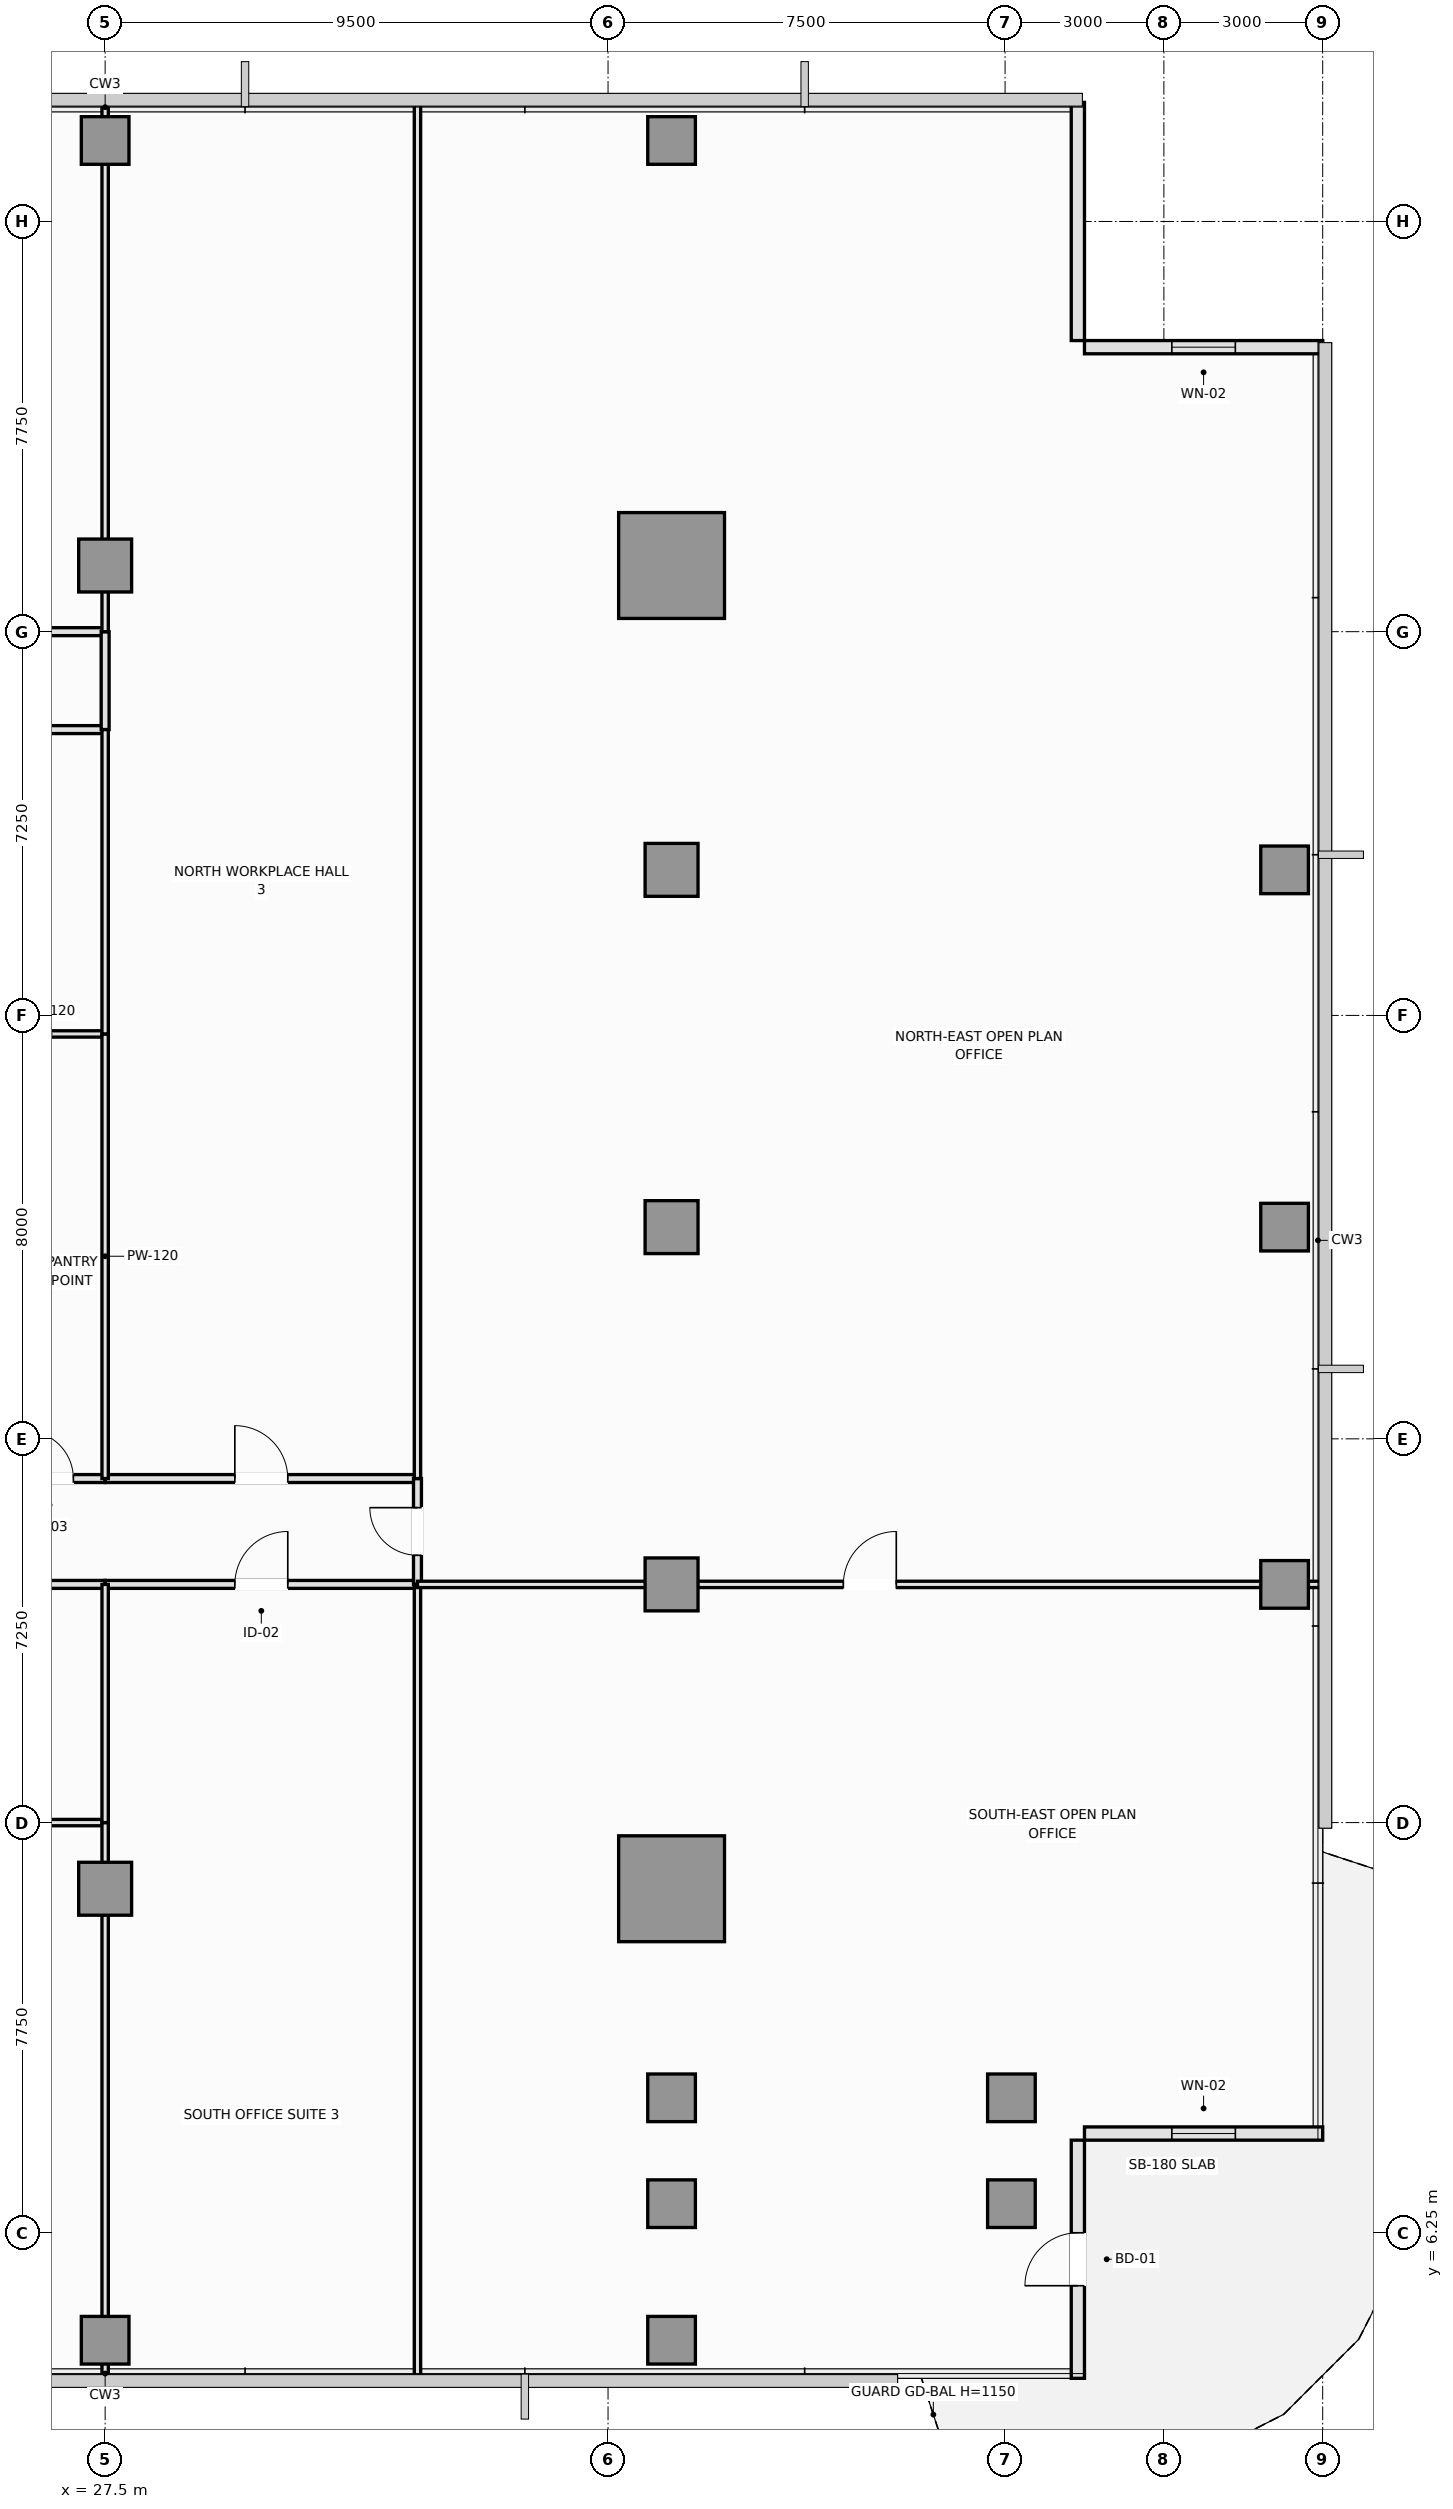
"""IFC4 building model, lengths in metres.
Left out: names, types, materials, properties, quantities, classifications, styles, units other than length and angle.
Written with IfcOpenShell. Run it as: python <this file> out.ifc"""

import sys

from ifc_helpers import new_model, si_unit, direction, frame, frame_2d, origin, origin_2d, place, context, subcontext, project, spatial, rectangle, extrude, element, fill, save


model = new_model("IFC4")
c1 = context("Model", 3, precision=1e-05, world=origin(), true_north=direction((0.0, 1.0)))
c2 = subcontext(c1, "Body", "Model", "MODEL_VIEW")
j1 = project(units=[si_unit("LENGTHUNIT", "METRE"), si_unit("PLANEANGLEUNIT", "RADIAN")], contexts=[c1])
p1 = place(None, origin())
s1 = spatial("IfcSite", under=j1, at=p1, CompositionType="ELEMENT")
p2 = place(p1, origin())
s2 = spatial("IfcBuilding", under=s1, at=p2, CompositionType="ELEMENT")
p3 = place(p2, frame((0.0, 0.0, 137.75)))
s3 = spatial("IfcBuildingStorey", under=s2, at=p3, CompositionType="ELEMENT", Elevation=137.75)
for number, where, z_axis, x_axis in (
    (1, (38.2, 12.75, 0.0), (0.0, 0.0, 1.0), (1.0, 0.0, 0.0)),
    (2, (38.2, 37.75, 0.0), (0.0, 0.0, 1.0), (1.0, 0.0, 0.0)),
):
    element("IfcColumn", number, at=place(p3, frame(where, z_axis=z_axis, x_axis=x_axis)), inside=s3, PredefinedType="COLUMN", context=c2, shape_type="SweptSolid", body=[
        extrude(rectangle(XDim=2.0, YDim=2.0, at=origin_2d()), origin(), (0.0, 0.0, 1.0), 3.55),
    ])
for number, where, z_axis, x_axis in (
    (3, (27.5, 12.75, 0.0), (0.0, 0.0, 1.0), (1.0, 0.0, 0.0)),
    (4, (27.5, 37.75, 0.0), (0.0, 0.0, 1.0), (1.0, 0.0, 0.0)),
    (5, (38.2, 18.5, 0.0), (0.0, 0.0, 1.0), (1.0, 0.0, 0.0)),
    (6, (38.2, 25.25, 0.0), (0.0, 0.0, 1.0), (1.0, 0.0, 0.0)),
    (7, (38.2, 32.0, 0.0), (0.0, 0.0, 1.0), (1.0, 0.0, 0.0)),
):
    element("IfcColumn", number, at=place(p3, frame(where, z_axis=z_axis, x_axis=x_axis)), inside=s3, PredefinedType="COLUMN", context=c2, shape_type="SweptSolid", body=[
        extrude(rectangle(XDim=1.0, YDim=1.0, at=origin_2d()), origin(), (0.0, 0.0, 1.0), 3.55),
    ])
for number, where, z_axis, x_axis in (
    (8, (38.2, 6.8, 0.0), (0.0, 0.0, 1.0), (1.0, 0.0, 0.0)),
    (9, (38.2, 8.8, 0.0), (0.0, 0.0, 1.0), (1.0, 0.0, 0.0)),
    (10, (44.62, 6.8, 0.0), (0.0, 0.0, 1.0), (1.0, 0.0, 0.0)),
    (11, (44.62, 8.8, 0.0), (0.0, 0.0, 1.0), (1.0, 0.0, 0.0)),
    (12, (49.78, 18.5, 0.0), (0.0, 0.0, 1.0), (1.0, 0.0, 0.0)),
    (13, (49.78, 25.25, 0.0), (0.0, 0.0, 1.0), (1.0, 0.0, 0.0)),
    (14, (49.78, 32.0, 0.0), (0.0, 0.0, 1.0), (1.0, 0.0, 0.0)),
    (15, (27.5, 4.22, 0.0), (0.0, 0.0, 1.0), (1.0, 0.0, 0.0)),
    (16, (38.2, 4.22, 0.0), (0.0, 0.0, 1.0), (1.0, 0.0, 0.0)),
    (17, (27.5, 45.78, 0.0), (0.0, 0.0, 1.0), (1.0, 0.0, 0.0)),
    (18, (38.2, 45.78, 0.0), (0.0, 0.0, 1.0), (1.0, 0.0, 0.0)),
):
    element("IfcColumn", number, at=place(p3, frame(where, z_axis=z_axis, x_axis=x_axis)), inside=s3, PredefinedType="COLUMN", context=c2, shape_type="SweptSolid", body=[
        extrude(rectangle(XDim=0.9, YDim=0.9, at=origin_2d()), origin(), (0.0, 0.0, 1.0), 3.55),
    ])
p4 = place(p3, frame((45.875, 3.5, 0.0), z_axis=(0.0, 0.0, 1.0), x_axis=(0.0, 1.0, 0.0)))
e19 = element("IfcWall", 19, at=p4, inside=s3, PredefinedType="SOLIDWALL", context=c2, shape_type="SweptSolid", body=[
    extrude(rectangle(XDim=4.5, YDim=0.25, at=frame_2d((2.25, 0.0))), origin(), (0.0, 0.0, 1.0), 3.07),
])
p5 = place(p4, frame((1.75, 0.0, 0.0)))
e20 = element("IfcOpeningElement", 20, at=p5, cuts=e19, PredefinedType="OPENING", context=c2, shape_type="SweptSolid", body=[
    extrude(rectangle(XDim=1.0, YDim=2.2, at=frame_2d((0.5, 1.1))), frame((0.0, 0.135, 0.0), z_axis=(0.0, -1.0, 0.0), x_axis=(1.0, 0.0, 0.0)), (0.0, 0.0, 1.0), 0.27),
])
p6 = place(p3, frame((46.0, 8.125, 0.0), z_axis=(0.0, 0.0, 1.0), x_axis=(1.0, 0.0, 0.0)))
e21 = element("IfcWall", 21, at=p6, inside=s3, PredefinedType="SOLIDWALL", context=c2, shape_type="SweptSolid", body=[
    extrude(rectangle(XDim=4.5, YDim=0.25, at=frame_2d((2.25, 0.0))), origin(), (0.0, 0.0, 1.0), 3.1),
])
p7 = place(p6, frame((1.65, 0.0, 0.9)))
e22 = element("IfcOpeningElement", 22, at=p7, cuts=e21, PredefinedType="OPENING", context=c2, shape_type="SweptSolid", body=[
    extrude(rectangle(XDim=1.2, YDim=1.8, at=frame_2d((0.6, 0.9))), frame((0.0, 0.135, 0.0), z_axis=(0.0, -1.0, 0.0), x_axis=(1.0, 0.0, 0.0)), (0.0, 0.0, 1.0), 0.27),
])
p8 = place(p3, frame((50.5, 41.875, 0.0), z_axis=(0.0, 0.0, 1.0), x_axis=(-1.0, 0.0, 0.0)))
e23 = element("IfcWall", 23, at=p8, inside=s3, PredefinedType="SOLIDWALL", context=c2, shape_type="SweptSolid", body=[
    extrude(rectangle(XDim=4.5, YDim=0.25, at=frame_2d((2.25, 0.0))), origin(), (0.0, 0.0, 1.0), 3.37),
])
p9 = place(p8, frame((1.65, 0.0, 0.9)))
e24 = element("IfcOpeningElement", 24, at=p9, cuts=e23, PredefinedType="OPENING", context=c2, shape_type="SweptSolid", body=[
    extrude(rectangle(XDim=1.2, YDim=1.8, at=frame_2d((0.6, 0.9))), frame((0.0, 0.135, 0.0), z_axis=(0.0, -1.0, 0.0), x_axis=(1.0, 0.0, 0.0)), (0.0, 0.0, 1.0), 0.27),
])
p10 = place(p3, frame((45.875, 42.0, 0.0), z_axis=(0.0, 0.0, 1.0), x_axis=(0.0, 1.0, 0.0)))
e25 = element("IfcWall", 25, at=p10, inside=s3, PredefinedType="SOLIDWALL", context=c2, shape_type="SweptSolid", body=[
    extrude(rectangle(XDim=4.5, YDim=0.25, at=frame_2d((2.25, 0.0))), origin(), (0.0, 0.0, 1.0), 3.37),
])
p11 = place(p3, frame((25.4, 20.5, 0.0), z_axis=(0.0, 0.0, 1.0), x_axis=(1.0, 0.0, 0.0)))
e26 = element("IfcWall", 26, at=p11, inside=s3, PredefinedType="PARTITIONING", context=c2, shape_type="SweptSolid", body=[
    extrude(rectangle(XDim=2.1, YDim=0.15, at=frame_2d((1.05, 0.0))), origin(), (0.0, 0.0, 1.0), 3.37),
])
p12 = place(p11, frame((0.6, 0.0, 0.0)))
e27 = element("IfcOpeningElement", 27, at=p12, cuts=e26, PredefinedType="OPENING", context=c2, shape_type="SweptSolid", body=[
    extrude(rectangle(XDim=0.9, YDim=2.1, at=frame_2d((0.45, 1.05))), frame((0.0, 0.085, 0.0), z_axis=(0.0, -1.0, 0.0), x_axis=(1.0, 0.0, 0.0)), (0.0, 0.0, 1.0), 0.17),
])
p13 = place(p3, frame((19.95, 18.5, 0.0), z_axis=(0.0, 0.0, 1.0), x_axis=(1.0, 0.0, 0.0)))
e28 = element("IfcWall", 28, at=p13, inside=s3, PredefinedType="PARTITIONING", context=c2, shape_type="SweptSolid", body=[
    extrude(rectangle(XDim=7.55, YDim=0.15, at=frame_2d((3.775, 0.0))), origin(), (0.0, 0.0, 1.0), 2.77),
])
p14 = place(p3, frame((27.5, 18.5, 0.0), z_axis=(0.0, 0.0, 1.0), x_axis=(1.0, 0.0, 0.0)))
e29 = element("IfcWall", 29, at=p14, inside=s3, PredefinedType="PARTITIONING", context=c2, shape_type="SweptSolid", body=[
    extrude(rectangle(XDim=5.9, YDim=0.15, at=frame_2d((2.95, 0.0))), origin(), (0.0, 0.0, 1.0), 2.77),
])
p15 = place(p14, frame((2.45, 0.0, 0.0)))
e30 = element("IfcOpeningElement", 30, at=p15, cuts=e29, PredefinedType="OPENING", context=c2, shape_type="SweptSolid", body=[
    extrude(rectangle(XDim=1.0, YDim=2.15, at=frame_2d((0.5, 1.075))), frame((0.0, 0.085, 0.0), z_axis=(0.0, -1.0, 0.0), x_axis=(1.0, 0.0, 0.0)), (0.0, 0.0, 1.0), 0.17),
])
p16 = place(p3, frame((27.5, 20.5, 0.0), z_axis=(0.0, 0.0, 1.0), x_axis=(1.0, 0.0, 0.0)))
e31 = element("IfcWall", 31, at=p16, inside=s3, PredefinedType="PARTITIONING", context=c2, shape_type="SweptSolid", body=[
    extrude(rectangle(XDim=5.9, YDim=0.15, at=frame_2d((2.95, 0.0))), origin(), (0.0, 0.0, 1.0), 3.37),
])
p17 = place(p16, frame((2.45, 0.0, 0.0)))
e32 = element("IfcOpeningElement", 32, at=p17, cuts=e31, PredefinedType="OPENING", context=c2, shape_type="SweptSolid", body=[
    extrude(rectangle(XDim=1.0, YDim=2.15, at=frame_2d((0.5, 1.075))), frame((0.0, 0.085, 0.0), z_axis=(0.0, -1.0, 0.0), x_axis=(1.0, 0.0, 0.0)), (0.0, 0.0, 1.0), 0.17),
])
p18 = place(p3, frame((33.4, 18.5, 0.0), z_axis=(0.0, 0.0, 1.0), x_axis=(0.0, 1.0, 0.0)))
e33 = element("IfcWall", 33, at=p18, inside=s3, PredefinedType="PARTITIONING", context=c2, shape_type="SweptSolid", body=[
    extrude(rectangle(XDim=2.0, YDim=0.15, at=frame_2d((1.0, 0.0))), origin(), (0.0, 0.0, 1.0), 3.37),
])
p19 = place(p18, frame((0.55, 0.0, 0.0)))
e34 = element("IfcOpeningElement", 34, at=p19, cuts=e33, PredefinedType="OPENING", context=c2, shape_type="SweptSolid", body=[
    extrude(rectangle(XDim=0.9, YDim=2.1, at=frame_2d((0.45, 1.05))), frame((0.0, 0.085, 0.0), z_axis=(0.0, -1.0, 0.0), x_axis=(1.0, 0.0, 0.0)), (0.0, 0.0, 1.0), 0.17),
])
p20 = place(p3, frame((19.95, 34.65, 0.0), z_axis=(0.0, 0.0, 1.0), x_axis=(1.0, 0.0, 0.0)))
e35 = element("IfcWall", 35, at=p20, inside=s3, PredefinedType="PARTITIONING", context=c2, shape_type="SweptSolid", body=[
    extrude(rectangle(XDim=7.55, YDim=0.15, at=frame_2d((3.775, 0.0))), origin(), (0.0, 0.0, 1.0), 3.37),
])
p21 = place(p3, frame((19.95, 36.5, 0.0), z_axis=(0.0, 0.0, 1.0), x_axis=(1.0, 0.0, 0.0)))
e36 = element("IfcWall", 36, at=p21, inside=s3, PredefinedType="PARTITIONING", context=c2, shape_type="SweptSolid", body=[
    extrude(rectangle(XDim=7.55, YDim=0.15, at=frame_2d((3.775, 0.0))), origin(), (0.0, 0.0, 1.0), 3.37),
])
p22 = place(p21, frame((3.275, 0.0, 0.0)))
e37 = element("IfcOpeningElement", 37, at=p22, cuts=e36, PredefinedType="OPENING", context=c2, shape_type="SweptSolid", body=[
    extrude(rectangle(XDim=1.0, YDim=2.15, at=frame_2d((0.5, 1.075))), frame((0.0, 0.085, 0.0), z_axis=(0.0, -1.0, 0.0), x_axis=(1.0, 0.0, 0.0)), (0.0, 0.0, 1.0), 0.17),
])
p23 = place(p3, frame((27.5, 34.65, 0.0), z_axis=(0.0, 0.0, 1.0), x_axis=(0.0, 1.0, 0.0)))
e38 = element("IfcWall", 38, at=p23, inside=s3, PredefinedType="PARTITIONING", context=c2, shape_type="SweptSolid", body=[
    extrude(rectangle(XDim=1.85, YDim=0.15, at=frame_2d((0.925, 0.0))), origin(), (0.0, 0.0, 1.0), 3.37),
])
p24 = place(p3, frame((25.4, 28.9, 0.0), z_axis=(0.0, 0.0, 1.0), x_axis=(1.0, 0.0, 0.0)))
e39 = element("IfcWall", 39, at=p24, inside=s3, PredefinedType="PARTITIONING", context=c2, shape_type="SweptSolid", body=[
    extrude(rectangle(XDim=2.1, YDim=0.12, at=frame_2d((1.05, 0.0))), origin(), (0.0, 0.0, 1.0), 3.37),
])
p25 = place(p3, frame((27.5, 20.5, 0.0), z_axis=(0.0, 0.0, 1.0), x_axis=(0.0, 1.0, 0.0)))
e40 = element("IfcWall", 40, at=p25, inside=s3, PredefinedType="PARTITIONING", context=c2, shape_type="SweptSolid", body=[
    extrude(rectangle(XDim=8.4, YDim=0.12, at=frame_2d((4.2, 0.0))), origin(), (0.0, 0.0, 1.0), 3.37),
])
p26 = place(p3, frame((27.5, 28.9, 0.0), z_axis=(0.0, 0.0, 1.0), x_axis=(0.0, 1.0, 0.0)))
e41 = element("IfcWall", 41, at=p26, inside=s3, PredefinedType="PARTITIONING", context=c2, shape_type="SweptSolid", body=[
    extrude(rectangle(XDim=5.75, YDim=0.12, at=frame_2d((2.875, 0.0))), origin(), (0.0, 0.0, 1.0), 3.37),
])
p27 = place(p3, frame((19.95, 14.0, 0.0), z_axis=(0.0, 0.0, 1.0), x_axis=(1.0, 0.0, 0.0)))
e42 = element("IfcWall", 42, at=p27, inside=s3, PredefinedType="PARTITIONING", context=c2, shape_type="SweptSolid", body=[
    extrude(rectangle(XDim=7.55, YDim=0.12, at=frame_2d((3.775, 0.0))), origin(), (0.0, 0.0, 1.0), 3.37),
])
p28 = place(p3, frame((27.5, 3.51, 0.0), z_axis=(0.0, 0.0, 1.0), x_axis=(0.0, 1.0, 0.0)))
e43 = element("IfcWall", 43, at=p28, inside=s3, PredefinedType="PARTITIONING", context=c2, shape_type="SweptSolid", body=[
    extrude(rectangle(XDim=10.49, YDim=0.12, at=frame_2d((5.245, 0.0))), origin(), (0.0, 0.0, 1.0), 2.87),
])
p29 = place(p3, frame((27.5, 14.0, 0.0), z_axis=(0.0, 0.0, 1.0), x_axis=(0.0, 1.0, 0.0)))
e44 = element("IfcWall", 44, at=p29, inside=s3, PredefinedType="PARTITIONING", context=c2, shape_type="SweptSolid", body=[
    extrude(rectangle(XDim=4.5, YDim=0.12, at=frame_2d((2.25, 0.0))), origin(), (0.0, 0.0, 1.0), 3.37),
])
p30 = place(p3, frame((33.4, 3.51, 0.0), z_axis=(0.0, 0.0, 1.0), x_axis=(0.0, 1.0, 0.0)))
e45 = element("IfcWall", 45, at=p30, inside=s3, PredefinedType="PARTITIONING", context=c2, shape_type="SweptSolid", body=[
    extrude(rectangle(XDim=14.99, YDim=0.12, at=frame_2d((7.495, 0.0))), origin(), (0.0, 0.0, 1.0), 3.37),
])
p31 = place(p3, frame((27.5, 36.5, 0.0), z_axis=(0.0, 0.0, 1.0), x_axis=(0.0, 1.0, 0.0)))
e46 = element("IfcWall", 46, at=p31, inside=s3, PredefinedType="PARTITIONING", context=c2, shape_type="SweptSolid", body=[
    extrude(rectangle(XDim=9.99, YDim=0.12, at=frame_2d((4.995, 0.0))), origin(), (0.0, 0.0, 1.0), 2.87),
])
p32 = place(p3, frame((33.4, 20.5, 0.0), z_axis=(0.0, 0.0, 1.0), x_axis=(0.0, 1.0, 0.0)))
e47 = element("IfcWall", 47, at=p32, inside=s3, PredefinedType="PARTITIONING", context=c2, shape_type="SweptSolid", body=[
    extrude(rectangle(XDim=25.99, YDim=0.12, at=frame_2d((12.995, 0.0))), origin(), (0.0, 0.0, 1.0), 3.37),
])
p33 = place(p3, frame((33.4, 18.5, 0.0), z_axis=(0.0, 0.0, 1.0), x_axis=(1.0, 0.0, 0.0)))
e48 = element("IfcWall", 48, at=p33, inside=s3, PredefinedType="PARTITIONING", context=c2, shape_type="SweptSolid", body=[
    extrude(rectangle(XDim=17.09, YDim=0.12, at=frame_2d((8.545, 0.0))), origin(), (0.0, 0.0, 1.0), 2.77),
])
p34 = place(p33, frame((8.045, 0.0, 0.0)))
e49 = element("IfcOpeningElement", 49, at=p34, cuts=e48, PredefinedType="OPENING", context=c2, shape_type="SweptSolid", body=[
    extrude(rectangle(XDim=1.0, YDim=2.15, at=frame_2d((0.5, 1.075))), frame((0.0, 0.07, 0.0), z_axis=(0.0, -1.0, 0.0), x_axis=(1.0, 0.0, 0.0)), (0.0, 0.0, 1.0), 0.14),
])
p35 = place(p5, frame((1.0, 0.0, 0.0), z_axis=(0.0, 0.0, 1.0), x_axis=(-1.0, 0.0, 0.0)))
e50 = element("IfcDoor", 50, at=p35, inside=s3, OperationType="SINGLE_SWING_LEFT", PredefinedType="DOOR", context=c2, shape_type="SweptSolid", body=[
    extrude(rectangle(XDim=1.0, YDim=2.2, at=frame_2d((0.5, 1.1))), frame((0.0, 0.025, 0.0), z_axis=(0.0, -1.0, 0.0), x_axis=(1.0, 0.0, 0.0)), (0.0, 0.0, 1.0), 0.05),
])
fill(e20, e50)
p36 = place(p7, origin())
e51 = element("IfcWindow", 51, at=p36, inside=s3, PartitioningType="SINGLE_PANEL", PredefinedType="WINDOW", context=c2, shape_type="SweptSolid", body=[
    extrude(rectangle(XDim=1.2, YDim=1.8, at=frame_2d((0.6, 0.9))), frame((0.0, 0.03, 0.0), z_axis=(0.0, -1.0, 0.0), x_axis=(1.0, 0.0, 0.0)), (0.0, 0.0, 1.0), 0.06),
])
fill(e22, e51)
p37 = place(p9, origin())
e52 = element("IfcWindow", 52, at=p37, inside=s3, PartitioningType="SINGLE_PANEL", PredefinedType="WINDOW", context=c2, shape_type="SweptSolid", body=[
    extrude(rectangle(XDim=1.2, YDim=1.8, at=frame_2d((0.6, 0.9))), frame((0.0, 0.03, 0.0), z_axis=(0.0, -1.0, 0.0), x_axis=(1.0, 0.0, 0.0)), (0.0, 0.0, 1.0), 0.06),
])
fill(e24, e52)
p38 = place(p12, origin())
e53 = element("IfcDoor", 53, at=p38, inside=s3, OperationType="SINGLE_SWING_LEFT", PredefinedType="DOOR", context=c2, shape_type="SweptSolid", body=[
    extrude(rectangle(XDim=0.9, YDim=2.1, at=frame_2d((0.45, 1.05))), frame((0.0, 0.025, 0.0), z_axis=(0.0, -1.0, 0.0), x_axis=(1.0, 0.0, 0.0)), (0.0, 0.0, 1.0), 0.05),
])
fill(e27, e53)
p39 = place(p15, origin())
e54 = element("IfcDoor", 54, at=p39, inside=s3, OperationType="SINGLE_SWING_RIGHT", PredefinedType="DOOR", context=c2, shape_type="SweptSolid", body=[
    extrude(rectangle(XDim=1.0, YDim=2.15, at=frame_2d((0.5, 1.075))), frame((0.0, 0.025, 0.0), z_axis=(0.0, -1.0, 0.0), x_axis=(1.0, 0.0, 0.0)), (0.0, 0.0, 1.0), 0.05),
])
fill(e30, e54)
p40 = place(p17, origin())
e55 = element("IfcDoor", 55, at=p40, inside=s3, OperationType="SINGLE_SWING_LEFT", PredefinedType="DOOR", context=c2, shape_type="SweptSolid", body=[
    extrude(rectangle(XDim=1.0, YDim=2.15, at=frame_2d((0.5, 1.075))), frame((0.0, 0.025, 0.0), z_axis=(0.0, -1.0, 0.0), x_axis=(1.0, 0.0, 0.0)), (0.0, 0.0, 1.0), 0.05),
])
fill(e32, e55)
p41 = place(p19, origin())
e56 = element("IfcDoor", 56, at=p41, inside=s3, OperationType="SINGLE_SWING_RIGHT", PredefinedType="DOOR", context=c2, shape_type="SweptSolid", body=[
    extrude(rectangle(XDim=0.9, YDim=2.1, at=frame_2d((0.45, 1.05))), frame((0.0, 0.025, 0.0), z_axis=(0.0, -1.0, 0.0), x_axis=(1.0, 0.0, 0.0)), (0.0, 0.0, 1.0), 0.05),
])
fill(e34, e56)
p42 = place(p34, origin())
e57 = element("IfcDoor", 57, at=p42, inside=s3, OperationType="SINGLE_SWING_RIGHT", PredefinedType="DOOR", context=c2, shape_type="SweptSolid", body=[
    extrude(rectangle(XDim=1.0, YDim=2.15, at=frame_2d((0.5, 1.075))), frame((0.0, 0.025, 0.0), z_axis=(0.0, -1.0, 0.0), x_axis=(1.0, 0.0, 0.0)), (0.0, 0.0, 1.0), 0.05),
])
fill(e49, e57)
save(model, sys.argv[1])
